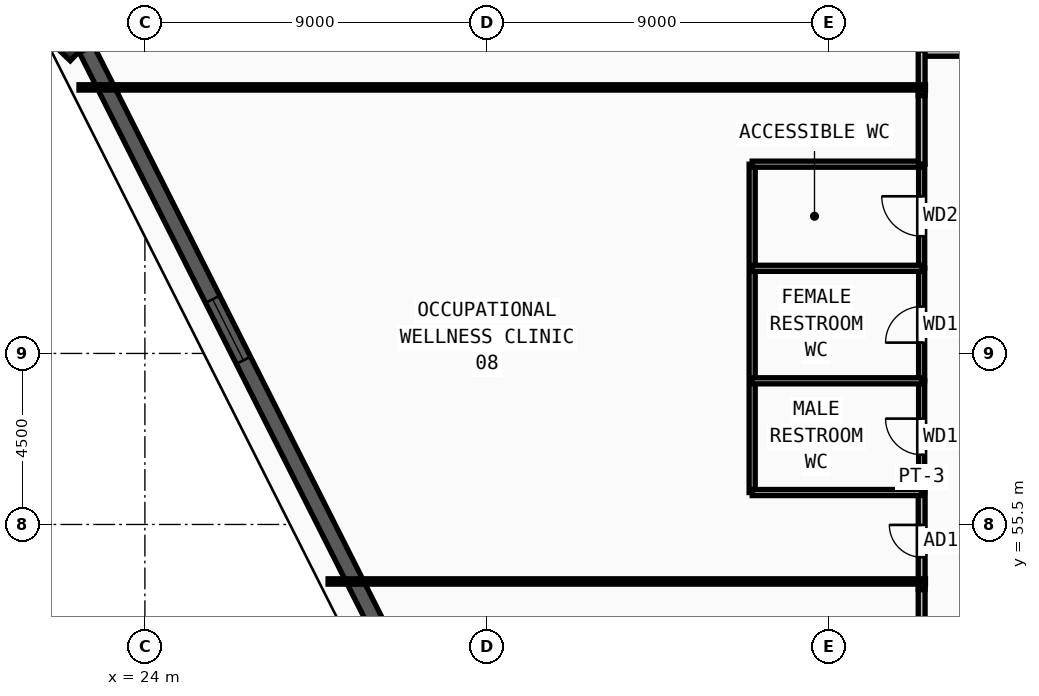
"""IFC4 building model, lengths in metres.
Left out: names, types, materials, properties, quantities, classifications, styles, units other than length and angle.
Written with IfcOpenShell. Run it as: python <this file> out.ifc"""

import sys

from ifc_helpers import new_model, si_unit, direction, frame, frame_2d, origin, origin_2d, place, context, subcontext, project, spatial, rectangle, extrude, source, transform, mapped, element, fill, save


model = new_model("IFC4")
c1 = context("Model", 3, precision=1e-05, world=origin(), true_north=direction((0.0, 1.0)))
c2 = subcontext(c1, "Body", "Model", "MODEL_VIEW")
j1 = project(units=[si_unit("LENGTHUNIT", "METRE"), si_unit("PLANEANGLEUNIT", "RADIAN")], contexts=[c1])
p1 = place(None, origin())
s1 = spatial("IfcSite", under=j1, at=p1, CompositionType="ELEMENT")
p2 = place(p1, origin())
s2 = spatial("IfcBuilding", under=s1, at=p2, CompositionType="ELEMENT")
p3 = place(p2, frame((0.0, 0.0, 74.25)))
s3 = spatial("IfcBuildingStorey", under=s2, at=p3, CompositionType="ELEMENT", Elevation=74.25)
m1 = source(origin(), c2, "Body", "SweptSolid", [
    extrude(rectangle(XDim=1.55, YDim=1.25, at=origin_2d()), origin(), (0.0, 0.0, 1.0), 3.75),
])
p4 = place(p3, frame((22.118, 68.693, 0.0), z_axis=(0.0, 0.0, 1.0), x_axis=(0.68936671806, 0.724412539946, 0.0)))
e1 = element("IfcColumn", 1, at=p4, inside=s3, PredefinedType="COLUMN", context=c2, shape_type="MappedRepresentation", body=[
    mapped(m1, transform((0.0, 0.0, 0.0), x_axis=(1.0, 0.0, 0.0), y_axis=(0.0, 1.0, 0.0), z_axis=(0.0, 0.0, 1.0), scale=1.0)),
])
p5 = place(p3, frame((22.462, 68.01, 0.0), z_axis=(0.0, 0.0, 1.0), x_axis=(0.450259201953, -0.89289789509, 0.0)))
e2 = element("IfcWall", 2, at=p5, inside=s3, PredefinedType="SOLIDWALL", context=c2, shape_type="SweptSolid", body=[
    extrude(rectangle(XDim=33.094, YDim=0.42, at=frame_2d((16.547, 0.0))), origin(), (0.0, 0.0, 1.0), 3.57),
])
m2 = source(origin(), c2, "Body", "SweptSolid", [
    extrude(rectangle(XDim=1.8, YDim=1.95, at=frame_2d((0.9, 0.975))), frame((0.0, 0.22, 0.0), z_axis=(0.0, -1.0, 0.0), x_axis=(1.0, 0.0, 0.0)), (0.0, 0.0, 1.0), 0.44),
])
p6 = place(p5, frame((7.374, 0.0, 0.55)))
e3 = element("IfcOpeningElement", 3, at=p6, cuts=e2, PredefinedType="OPENING", context=c2, shape_type="MappedRepresentation", body=[
    mapped(m2, transform((0.0, 0.0, 0.0), x_axis=(1.0, 0.0, 0.0), y_axis=(0.0, 1.0, 0.0), z_axis=(0.0, 0.0, 1.0), scale=1.0)),
])
p7 = place(p5, frame((17.197, 0.0, 0.55)))
e4 = element("IfcOpeningElement", 4, at=p7, cuts=e2, PredefinedType="OPENING", context=c2, shape_type="MappedRepresentation", body=[
    mapped(m2, transform((0.0, 0.0, 0.0), x_axis=(1.0, 0.0, 0.0), y_axis=(0.0, 1.0, 0.0), z_axis=(0.0, 0.0, 1.0), scale=1.0)),
])
p8 = place(p5, frame((23.071, 0.0, 0.55)))
e5 = element("IfcOpeningElement", 5, at=p8, cuts=e2, PredefinedType="OPENING", context=c2, shape_type="MappedRepresentation", body=[
    mapped(m2, transform((0.0, 0.0, 0.0), x_axis=(1.0, 0.0, 0.0), y_axis=(0.0, 1.0, 0.0), z_axis=(0.0, 0.0, 1.0), scale=1.0)),
])
p9 = place(p3, frame((44.44, 56.34, 0.0), z_axis=(0.0, 0.0, 1.0), x_axis=(0.0, 1.0, 0.0)))
e6 = element("IfcWall", 6, at=p9, inside=s3, PredefinedType="PARTITIONING", context=c2, shape_type="SweptSolid", body=[
    extrude(rectangle(XDim=2.94, YDim=0.16, at=frame_2d((1.47, 0.0))), origin(), (0.0, 0.0, 1.0), 3.57),
])
m3 = source(origin(), c2, "Body", "SweptSolid", [
    extrude(rectangle(XDim=0.95, YDim=2.15, at=frame_2d((0.475, 1.075))), frame((0.0, 0.09, 0.0), z_axis=(0.0, -1.0, 0.0), x_axis=(1.0, 0.0, 0.0)), (0.0, 0.0, 1.0), 0.18),
])
p10 = place(p9, frame((0.995, 0.0, 0.0)))
e7 = element("IfcOpeningElement", 7, at=p10, cuts=e6, PredefinedType="OPENING", context=c2, shape_type="MappedRepresentation", body=[
    mapped(m3, transform((0.0, 0.0, 0.0), x_axis=(1.0, 0.0, 0.0), y_axis=(0.0, 1.0, 0.0), z_axis=(0.0, 0.0, 1.0), scale=1.0)),
])
p11 = place(p3, frame((44.44, 59.28, 0.0), z_axis=(0.0, 0.0, 1.0), x_axis=(0.0, 1.0, 0.0)))
e8 = element("IfcWall", 8, at=p11, inside=s3, PredefinedType="PARTITIONING", context=c2, shape_type="SweptSolid", body=[
    extrude(rectangle(XDim=2.96, YDim=0.16, at=frame_2d((1.48, 0.0))), origin(), (0.0, 0.0, 1.0), 3.57),
])
p12 = place(p11, frame((1.005, 0.0, 0.0)))
e9 = element("IfcOpeningElement", 9, at=p12, cuts=e8, PredefinedType="OPENING", context=c2, shape_type="MappedRepresentation", body=[
    mapped(m3, transform((0.0, 0.0, 0.0), x_axis=(1.0, 0.0, 0.0), y_axis=(0.0, 1.0, 0.0), z_axis=(0.0, 0.0, 1.0), scale=1.0)),
])
p13 = place(p3, frame((44.44, 62.24, 0.0), z_axis=(0.0, 0.0, 1.0), x_axis=(0.0, 1.0, 0.0)))
e10 = element("IfcWall", 10, at=p13, inside=s3, PredefinedType="PARTITIONING", context=c2, shape_type="SweptSolid", body=[
    extrude(rectangle(XDim=2.74, YDim=0.16, at=frame_2d((1.37, 0.0))), origin(), (0.0, 0.0, 1.0), 3.57),
])
m4 = source(origin(), c2, "Body", "SweptSolid", [
    extrude(rectangle(XDim=1.05, YDim=2.15, at=frame_2d((0.525, 1.075))), frame((0.0, 0.09, 0.0), z_axis=(0.0, -1.0, 0.0), x_axis=(1.0, 0.0, 0.0)), (0.0, 0.0, 1.0), 0.18),
])
p14 = place(p13, frame((0.845, 0.0, 0.0)))
e11 = element("IfcOpeningElement", 11, at=p14, cuts=e10, PredefinedType="OPENING", context=c2, shape_type="MappedRepresentation", body=[
    mapped(m4, transform((0.0, 0.0, 0.0), x_axis=(1.0, 0.0, 0.0), y_axis=(0.0, 1.0, 0.0), z_axis=(0.0, 0.0, 1.0), scale=1.0)),
])
p15 = place(p3, frame((44.37, 67.91, 0.0), z_axis=(0.0, 0.0, 1.0), x_axis=(1.0, 0.0, 0.0)))
e12 = element("IfcWall", 12, at=p15, inside=s3, PredefinedType="PARTITIONING", context=c2, shape_type="SweptSolid", body=[
    extrude(rectangle(XDim=7.345, YDim=0.18, at=frame_2d((3.672, 0.0))), origin(), (0.0, 0.0, 1.0), 3.57),
])
m5 = source(origin(), c2, "Body", "SweptSolid", [
    extrude(rectangle(XDim=1.5, YDim=2.2, at=frame_2d((0.75, 1.1))), frame((0.0, 0.1, 0.0), z_axis=(0.0, -1.0, 0.0), x_axis=(1.0, 0.0, 0.0)), (0.0, 0.0, 1.0), 0.2),
])
p16 = place(p15, frame((2.923, 0.0, 0.0)))
e13 = element("IfcOpeningElement", 13, at=p16, cuts=e12, PredefinedType="OPENING", context=c2, shape_type="MappedRepresentation", body=[
    mapped(m5, transform((0.0, 0.0, 0.0), x_axis=(1.0, 0.0, 0.0), y_axis=(0.0, 1.0, 0.0), z_axis=(0.0, 0.0, 1.0), scale=1.0)),
])
p17 = place(p3, frame((44.44, 53.785, 0.0), z_axis=(0.0, 0.0, 1.0), x_axis=(0.0, 1.0, 0.0)))
e14 = element("IfcWall", 14, at=p17, inside=s3, PredefinedType="PARTITIONING", context=c2, shape_type="SweptSolid", body=[
    extrude(rectangle(XDim=2.555, YDim=0.18, at=frame_2d((1.278, 0.0))), origin(), (0.0, 0.0, 1.0), 3.57),
])
m6 = source(origin(), c2, "Body", "SweptSolid", [
    extrude(rectangle(XDim=0.85, YDim=2.1, at=frame_2d((0.425, 1.05))), frame((0.0, 0.1, 0.0), z_axis=(0.0, -1.0, 0.0), x_axis=(1.0, 0.0, 0.0)), (0.0, 0.0, 1.0), 0.2),
])
p18 = place(p17, frame((0.853, 0.0, 0.0)))
e15 = element("IfcOpeningElement", 15, at=p18, cuts=e14, PredefinedType="OPENING", context=c2, shape_type="MappedRepresentation", body=[
    mapped(m6, transform((0.0, 0.0, 0.0), x_axis=(1.0, 0.0, 0.0), y_axis=(0.0, 1.0, 0.0), z_axis=(0.0, 0.0, 1.0), scale=1.0)),
])
p19 = place(p3, frame((44.44, 48.285, 0.0), z_axis=(0.0, 0.0, 1.0), x_axis=(0.0, 1.0, 0.0)))
e16 = element("IfcWall", 16, at=p19, inside=s3, PredefinedType="PARTITIONING", context=c2, shape_type="SweptSolid", body=[
    extrude(rectangle(XDim=5.5, YDim=0.18, at=frame_2d((2.75, 0.0))), origin(), (0.0, 0.0, 1.0), 3.57),
])
m7 = source(origin(), c2, "Body", "SweptSolid", [
    extrude(rectangle(XDim=1.0, YDim=2.2, at=frame_2d((0.5, 1.1))), frame((0.0, 0.1, 0.0), z_axis=(0.0, -1.0, 0.0), x_axis=(1.0, 0.0, 0.0)), (0.0, 0.0, 1.0), 0.2),
])
p20 = place(p19, frame((2.25, 0.0, 0.0)))
e17 = element("IfcOpeningElement", 17, at=p20, cuts=e16, PredefinedType="OPENING", context=c2, shape_type="MappedRepresentation", body=[
    mapped(m7, transform((0.0, 0.0, 0.0), x_axis=(1.0, 0.0, 0.0), y_axis=(0.0, 1.0, 0.0), z_axis=(0.0, 0.0, 1.0), scale=1.0)),
])
p21 = place(p3, frame((39.98, 56.34, 0.0), z_axis=(0.0, 0.0, 1.0), x_axis=(0.0, 1.0, 0.0)))
e18 = element("IfcWall", 18, at=p21, inside=s3, PredefinedType="PARTITIONING", context=c2, shape_type="SweptSolid", body=[
    extrude(rectangle(XDim=8.64, YDim=0.16, at=frame_2d((4.32, 0.0))), origin(), (0.0, 0.0, 1.0), 3.57),
])
for number, where, z_axis, x_axis in (
    (19, (39.98, 56.34, 0.0), (0.0, 0.0, 1.0), (1.0, 0.0, 0.0)),
    (20, (39.98, 59.28, 0.0), (0.0, 0.0, 1.0), (1.0, 0.0, 0.0)),
    (21, (39.98, 62.24, 0.0), (0.0, 0.0, 1.0), (1.0, 0.0, 0.0)),
    (22, (39.98, 64.98, 0.0), (0.0, 0.0, 1.0), (1.0, 0.0, 0.0)),
):
    element("IfcWall", number, at=place(p3, frame(where, z_axis=z_axis, x_axis=x_axis)), inside=s3, PredefinedType="PARTITIONING", context=c2, shape_type="SweptSolid", body=[
        extrude(rectangle(XDim=4.46, YDim=0.16, at=frame_2d((2.23, 0.0))), origin(), (0.0, 0.0, 1.0), 3.57),
    ])
p22 = place(p3, frame((44.44, 66.785, 0.0), z_axis=(0.0, 0.0, 1.0), x_axis=(0.0, 1.0, 0.0)))
e23 = element("IfcWall", 23, at=p22, inside=s3, PredefinedType="PARTITIONING", context=c2, shape_type="SweptSolid", body=[
    extrude(rectangle(XDim=1.195, YDim=0.18, at=frame_2d((0.598, 0.0))), origin(), (0.0, 0.0, 1.0), 3.57),
])
p23 = place(p3, frame((44.44, 64.98, 0.0), z_axis=(0.0, 0.0, 1.0), x_axis=(0.0, 1.0, 0.0)))
e24 = element("IfcWall", 24, at=p23, inside=s3, PredefinedType="PARTITIONING", context=c2, shape_type="SweptSolid", body=[
    extrude(rectangle(XDim=1.805, YDim=0.18, at=frame_2d((0.902, 0.0))), origin(), (0.0, 0.0, 1.0), 3.57),
])
p24 = place(p3, frame((44.54, 54.0, 0.0), z_axis=(0.0, 0.0, 1.0), x_axis=(-1.0, 0.0, 0.0)))
e25 = element("IfcWall", 25, at=p24, inside=s3, PredefinedType="PARTITIONING", context=c2, shape_type="SweptSolid", body=[
    extrude(rectangle(XDim=15.719, YDim=0.14, at=frame_2d((7.859, 0.0))), origin(), (0.0, 0.0, 1.0), 3.57),
])
p25 = place(p3, frame((44.54, 67.0, 0.0), z_axis=(0.0, 0.0, 1.0), x_axis=(-1.0, 0.0, 0.0)))
e26 = element("IfcWall", 26, at=p25, inside=s3, PredefinedType="PARTITIONING", context=c2, shape_type="SweptSolid", body=[
    extrude(rectangle(XDim=22.274, YDim=0.14, at=frame_2d((11.137, 0.0))), origin(), (0.0, 0.0, 1.0), 2.655),
])
m8 = source(origin(), c2, "Body", "SweptSolid", [
    extrude(rectangle(XDim=1.8, YDim=1.95, at=frame_2d((0.9, 0.975))), frame((0.0, 0.03, 0.0), z_axis=(0.0, -1.0, 0.0), x_axis=(1.0, 0.0, 0.0)), (0.0, 0.0, 1.0), 0.06),
])
p26 = place(p6, origin())
e27 = element("IfcWindow", 27, at=p26, inside=s3, PartitioningType="DOUBLE_PANEL_VERTICAL", PredefinedType="WINDOW", context=c2, shape_type="MappedRepresentation", body=[
    mapped(m8, transform((0.0, 0.0, 0.0), x_axis=(1.0, 0.0, 0.0), y_axis=(0.0, 1.0, 0.0), z_axis=(0.0, 0.0, 1.0), scale=1.0)),
])
fill(e3, e27)
m9 = source(origin(), c2, "Body", "SweptSolid", [
    extrude(rectangle(XDim=0.95, YDim=2.15, at=frame_2d((0.475, 1.075))), frame((0.0, 0.025, 0.0), z_axis=(0.0, -1.0, 0.0), x_axis=(1.0, 0.0, 0.0)), (0.0, 0.0, 1.0), 0.05),
])
p27 = place(p10, origin())
e28 = element("IfcDoor", 28, at=p27, inside=s3, OperationType="SINGLE_SWING_RIGHT", PredefinedType="DOOR", context=c2, shape_type="MappedRepresentation", body=[
    mapped(m9, transform((0.0, 0.0, 0.0), x_axis=(1.0, 0.0, 0.0), y_axis=(0.0, 1.0, 0.0), z_axis=(0.0, 0.0, 1.0), scale=1.0)),
])
fill(e7, e28)
p28 = place(p12, origin())
e29 = element("IfcDoor", 29, at=p28, inside=s3, OperationType="SINGLE_SWING_LEFT", PredefinedType="DOOR", context=c2, shape_type="MappedRepresentation", body=[
    mapped(m9, transform((0.0, 0.0, 0.0), x_axis=(1.0, 0.0, 0.0), y_axis=(0.0, 1.0, 0.0), z_axis=(0.0, 0.0, 1.0), scale=1.0)),
])
fill(e9, e29)
m10 = source(origin(), c2, "Body", "SweptSolid", [
    extrude(rectangle(XDim=1.05, YDim=2.15, at=frame_2d((0.525, 1.075))), frame((0.0, 0.025, 0.0), z_axis=(0.0, -1.0, 0.0), x_axis=(1.0, 0.0, 0.0)), (0.0, 0.0, 1.0), 0.05),
])
p29 = place(p14, origin())
e30 = element("IfcDoor", 30, at=p29, inside=s3, OperationType="SINGLE_SWING_RIGHT", PredefinedType="DOOR", context=c2, shape_type="MappedRepresentation", body=[
    mapped(m10, transform((0.0, 0.0, 0.0), x_axis=(1.0, 0.0, 0.0), y_axis=(0.0, 1.0, 0.0), z_axis=(0.0, 0.0, 1.0), scale=1.0)),
])
fill(e11, e30)
m11 = source(origin(), c2, "Body", "SweptSolid", [
    extrude(rectangle(XDim=0.85, YDim=2.1, at=frame_2d((0.425, 1.05))), frame((0.0, 0.025, 0.0), z_axis=(0.0, -1.0, 0.0), x_axis=(1.0, 0.0, 0.0)), (0.0, 0.0, 1.0), 0.05),
])
p30 = place(p18, origin())
e31 = element("IfcDoor", 31, at=p30, inside=s3, OperationType="SINGLE_SWING_RIGHT", PredefinedType="DOOR", context=c2, shape_type="MappedRepresentation", body=[
    mapped(m11, transform((0.0, 0.0, 0.0), x_axis=(1.0, 0.0, 0.0), y_axis=(0.0, 1.0, 0.0), z_axis=(0.0, 0.0, 1.0), scale=1.0)),
])
fill(e15, e31)
save(model, sys.argv[1])
